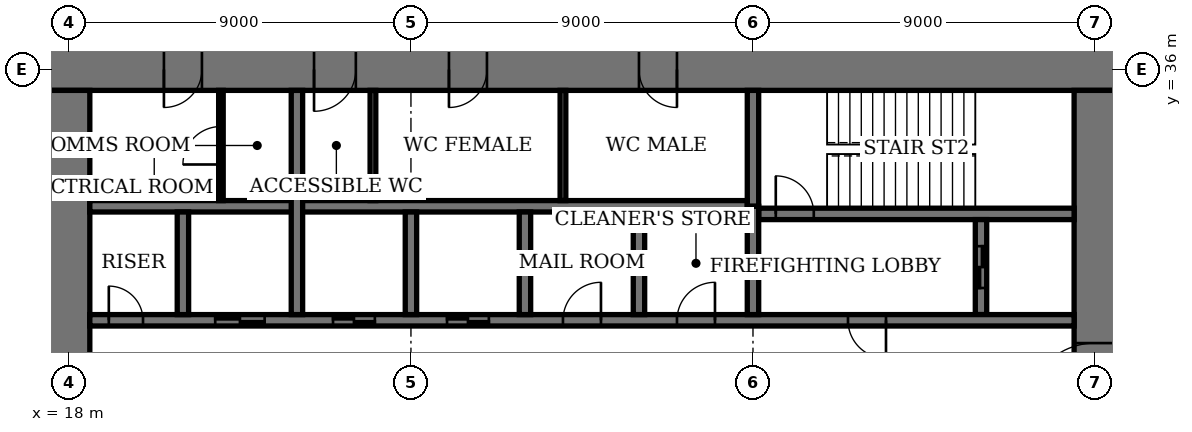
"""IFC4 building model, lengths in metres.
Left out: names, types, materials, properties, quantities, classifications, styles, units other than length and angle.
Written with IfcOpenShell. Run it as: python <this file> out.ifc"""

import sys

from ifc_helpers import new_model, si_unit, direction, frame, frame_2d, origin, place, context, subcontext, project, spatial, rectangle, extrude, element, fill, save


model = new_model("IFC4")
c1 = context("Model", 3, precision=1e-05, world=origin(), true_north=direction((0.0, 1.0)))
c2 = subcontext(c1, "Body", "Model", "MODEL_VIEW")
j1 = project(units=[si_unit("LENGTHUNIT", "METRE"), si_unit("PLANEANGLEUNIT", "RADIAN")], contexts=[c1])
p1 = place(None, origin())
s1 = spatial("IfcSite", under=j1, at=p1, CompositionType="ELEMENT")
p2 = place(p1, origin())
s2 = spatial("IfcBuilding", under=s1, at=p2, CompositionType="ELEMENT")
p3 = place(p2, frame((0.0, 0.0, 206.2)))
s3 = spatial("IfcBuildingStorey", under=s2, at=p3, CompositionType="ELEMENT", Elevation=206.2)
p4 = place(p3, frame((45.55, 36.0, 0.0), z_axis=(0.0, 0.0, 1.0), x_axis=(-1.0, 0.0, 0.0)))
e1 = element("IfcWall", 1, at=p4, inside=s3, PredefinedType="SHEAR", context=c2, shape_type="SweptSolid", body=[
    extrude(rectangle(XDim=28.1, YDim=1.1, at=frame_2d((14.05, 0.0))), origin(), (0.0, 0.0, 1.0), 4.0),
])
p5 = place(p4, frame((11.55, 0.0, 0.0)))
e2 = element("IfcOpeningElement", 2, at=p5, cuts=e1, PredefinedType="OPENING", context=c2, shape_type="SweptSolid", body=[
    extrude(rectangle(XDim=1.0, YDim=2.4, at=frame_2d((0.5, 1.2))), frame((0.0, 0.56, 0.0), z_axis=(0.0, -1.0, 0.0), x_axis=(1.0, 0.0, 0.0)), (0.0, 0.0, 1.0), 1.12),
])
p6 = place(p4, frame((16.55, 0.0, 0.0)))
e3 = element("IfcOpeningElement", 3, at=p6, cuts=e1, PredefinedType="OPENING", context=c2, shape_type="SweptSolid", body=[
    extrude(rectangle(XDim=1.0, YDim=2.4, at=frame_2d((0.5, 1.2))), frame((0.0, 0.56, 0.0), z_axis=(0.0, -1.0, 0.0), x_axis=(1.0, 0.0, 0.0)), (0.0, 0.0, 1.0), 1.12),
])
p7 = place(p4, frame((20.0, 0.0, 0.0)))
e4 = element("IfcOpeningElement", 4, at=p7, cuts=e1, PredefinedType="OPENING", context=c2, shape_type="SweptSolid", body=[
    extrude(rectangle(XDim=1.1, YDim=2.4, at=frame_2d((0.55, 1.2))), frame((0.0, 0.56, 0.0), z_axis=(0.0, -1.0, 0.0), x_axis=(1.0, 0.0, 0.0)), (0.0, 0.0, 1.0), 1.12),
])
p8 = place(p4, frame((24.05, 0.0, 0.0)))
e5 = element("IfcOpeningElement", 5, at=p8, cuts=e1, PredefinedType="OPENING", context=c2, shape_type="SweptSolid", body=[
    extrude(rectangle(XDim=1.0, YDim=2.4, at=frame_2d((0.5, 1.2))), frame((0.0, 0.56, 0.0), z_axis=(0.0, -1.0, 0.0), x_axis=(1.0, 0.0, 0.0)), (0.0, 0.0, 1.0), 1.12),
])
p9 = place(p3, frame((18.0, 35.45, 0.0), z_axis=(0.0, 0.0, 1.0), x_axis=(0.0, -1.0, 0.0)))
e6 = element("IfcWall", 6, at=p9, inside=s3, PredefinedType="SHEAR", context=c2, shape_type="SweptSolid", body=[
    extrude(rectangle(XDim=16.9, YDim=1.1, at=frame_2d((8.45, 0.0))), origin(), (0.0, 0.0, 1.0), 4.0),
])
p10 = place(p9, frame((8.45, 0.0, 0.0)))
e7 = element("IfcOpeningElement", 7, at=p10, cuts=e6, PredefinedType="OPENING", context=c2, shape_type="SweptSolid", body=[
    extrude(rectangle(XDim=1.8, YDim=2.4, at=frame_2d((0.9, 1.2))), frame((0.0, 0.56, 0.0), z_axis=(0.0, -1.0, 0.0), x_axis=(1.0, 0.0, 0.0)), (0.0, 0.0, 1.0), 1.12),
])
p11 = place(p3, frame((45.0, 18.55, 0.0), z_axis=(0.0, 0.0, 1.0), x_axis=(0.0, 1.0, 0.0)))
e8 = element("IfcWall", 8, at=p11, inside=s3, PredefinedType="SHEAR", context=c2, shape_type="SweptSolid", body=[
    extrude(rectangle(XDim=16.9, YDim=1.1, at=frame_2d((8.45, 0.0))), origin(), (0.0, 0.0, 1.0), 4.0),
])
p12 = place(p11, frame((8.45, 0.0, 0.0)))
e9 = element("IfcOpeningElement", 9, at=p12, cuts=e8, PredefinedType="OPENING", context=c2, shape_type="SweptSolid", body=[
    extrude(rectangle(XDim=1.8, YDim=2.4, at=frame_2d((0.9, 1.2))), frame((0.0, 0.56, 0.0), z_axis=(0.0, -1.0, 0.0), x_axis=(1.0, 0.0, 0.0)), (0.0, 0.0, 1.0), 1.12),
])
p13 = place(p3, frame((36.15, 32.2, 0.0), z_axis=(0.0, 0.0, 1.0), x_axis=(1.0, 0.0, 0.0)))
e10 = element("IfcWall", 10, at=p13, inside=s3, PredefinedType="SHEAR", context=c2, shape_type="SweptSolid", body=[
    extrude(rectangle(XDim=8.3, YDim=0.3, at=frame_2d((4.15, 0.0))), origin(), (0.0, 0.0, 1.0), 4.0),
])
p14 = place(p13, frame((0.45, 0.0, 0.0)))
e11 = element("IfcOpeningElement", 11, at=p14, cuts=e10, PredefinedType="OPENING", context=c2, shape_type="SweptSolid", body=[
    extrude(rectangle(XDim=1.0, YDim=2.4, at=frame_2d((0.5, 1.2))), frame((0.0, 0.16, 0.0), z_axis=(0.0, -1.0, 0.0), x_axis=(1.0, 0.0, 0.0)), (0.0, 0.0, 1.0), 0.32),
])
p15 = place(p3, frame((36.0, 32.4, 0.0), z_axis=(0.0, 0.0, 1.0), x_axis=(0.0, 1.0, 0.0)))
e12 = element("IfcWall", 12, at=p15, inside=s3, PredefinedType="SHEAR", context=c2, shape_type="SweptSolid", body=[
    extrude(rectangle(XDim=3.05, YDim=0.3, at=frame_2d((1.525, 0.0))), origin(), (0.0, 0.0, 1.0), 4.0),
])
p16 = place(p3, frame((42.0, 29.55, 0.0), z_axis=(0.0, 0.0, 1.0), x_axis=(0.0, 1.0, 0.0)))
e13 = element("IfcWall", 13, at=p16, inside=s3, PredefinedType="SHEAR", context=c2, shape_type="SweptSolid", body=[
    extrude(rectangle(XDim=2.5, YDim=0.3, at=frame_2d((1.25, 0.0))), origin(), (0.0, 0.0, 1.0), 4.0),
])
p17 = place(p16, frame((0.7, 0.0, 0.0)))
e14 = element("IfcOpeningElement", 14, at=p17, cuts=e13, PredefinedType="OPENING", context=c2, shape_type="SweptSolid", body=[
    extrude(rectangle(XDim=1.1, YDim=2.4, at=frame_2d((0.55, 1.2))), frame((0.0, 0.16, 0.0), z_axis=(0.0, -1.0, 0.0), x_axis=(1.0, 0.0, 0.0)), (0.0, 0.0, 1.0), 0.32),
])
p18 = place(p3, frame((18.55, 29.4, 0.0), z_axis=(0.0, 0.0, 1.0), x_axis=(1.0, 0.0, 0.0)))
e15 = element("IfcWall", 15, at=p18, inside=s3, PredefinedType="SHEAR", context=c2, shape_type="SweptSolid", body=[
    extrude(rectangle(XDim=25.9, YDim=0.3, at=frame_2d((12.95, 0.0))), origin(), (0.0, 0.0, 1.0), 4.0),
])
p19 = place(p18, frame((19.95, 0.0, 0.0)))
e16 = element("IfcOpeningElement", 16, at=p19, cuts=e15, PredefinedType="OPENING", context=c2, shape_type="SweptSolid", body=[
    extrude(rectangle(XDim=1.0, YDim=2.4, at=frame_2d((0.5, 1.2))), frame((0.0, 0.16, 0.0), z_axis=(0.0, -1.0, 0.0), x_axis=(1.0, 0.0, 0.0)), (0.0, 0.0, 1.0), 0.32),
])
p20 = place(p18, frame((0.5, 0.0, 0.0)))
e17 = element("IfcOpeningElement", 17, at=p20, cuts=e15, PredefinedType="OPENING", context=c2, shape_type="SweptSolid", body=[
    extrude(rectangle(XDim=0.9, YDim=2.1, at=frame_2d((0.45, 1.05))), frame((0.0, 0.16, 0.0), z_axis=(0.0, -1.0, 0.0), x_axis=(1.0, 0.0, 0.0)), (0.0, 0.0, 1.0), 0.32),
])
p21 = place(p18, frame((15.45, 0.0, 0.0)))
e18 = element("IfcOpeningElement", 18, at=p21, cuts=e15, PredefinedType="OPENING", context=c2, shape_type="SweptSolid", body=[
    extrude(rectangle(XDim=1.0, YDim=2.4, at=frame_2d((0.5, 1.2))), frame((0.0, 0.16, 0.0), z_axis=(0.0, -1.0, 0.0), x_axis=(1.0, 0.0, 0.0)), (0.0, 0.0, 1.0), 0.32),
])
p22 = place(p18, frame((12.45, 0.0, 0.0)))
e19 = element("IfcOpeningElement", 19, at=p22, cuts=e15, PredefinedType="OPENING", context=c2, shape_type="SweptSolid", body=[
    extrude(rectangle(XDim=1.0, YDim=2.4, at=frame_2d((0.5, 1.2))), frame((0.0, 0.16, 0.0), z_axis=(0.0, -1.0, 0.0), x_axis=(1.0, 0.0, 0.0)), (0.0, 0.0, 1.0), 0.32),
])
p23 = place(p18, frame((9.4, 0.0, 0.0)))
e20 = element("IfcOpeningElement", 20, at=p23, cuts=e15, PredefinedType="OPENING", context=c2, shape_type="SweptSolid", body=[
    extrude(rectangle(XDim=1.1, YDim=2.4, at=frame_2d((0.55, 1.2))), frame((0.0, 0.16, 0.0), z_axis=(0.0, -1.0, 0.0), x_axis=(1.0, 0.0, 0.0)), (0.0, 0.0, 1.0), 0.32),
])
p24 = place(p18, frame((6.4, 0.0, 0.0)))
e21 = element("IfcOpeningElement", 21, at=p24, cuts=e15, PredefinedType="OPENING", context=c2, shape_type="SweptSolid", body=[
    extrude(rectangle(XDim=1.1, YDim=2.4, at=frame_2d((0.55, 1.2))), frame((0.0, 0.16, 0.0), z_axis=(0.0, -1.0, 0.0), x_axis=(1.0, 0.0, 0.0)), (0.0, 0.0, 1.0), 0.32),
])
p25 = place(p18, frame((3.3, 0.0, 0.0)))
e22 = element("IfcOpeningElement", 22, at=p25, cuts=e15, PredefinedType="OPENING", context=c2, shape_type="SweptSolid", body=[
    extrude(rectangle(XDim=1.3, YDim=2.4, at=frame_2d((0.65, 1.2))), frame((0.0, 0.16, 0.0), z_axis=(0.0, -1.0, 0.0), x_axis=(1.0, 0.0, 0.0)), (0.0, 0.0, 1.0), 0.32),
])
p26 = place(p3, frame((18.55, 32.4, 0.0), z_axis=(0.0, 0.0, 1.0), x_axis=(1.0, 0.0, 0.0)))
e23 = element("IfcWall", 23, at=p26, inside=s3, PredefinedType="SHEAR", context=c2, shape_type="SweptSolid", body=[
    extrude(rectangle(XDim=17.3, YDim=0.3, at=frame_2d((8.65, 0.0))), origin(), (0.0, 0.0, 1.0), 4.0),
])
for number, where, z_axis, x_axis in (
    (24, (33.0, 29.55, 0.0), (0.0, 0.0, 1.0), (0.0, 1.0, 0.0)),
    (25, (30.0, 29.55, 0.0), (0.0, 0.0, 1.0), (0.0, 1.0, 0.0)),
    (26, (27.0, 29.55, 0.0), (0.0, 0.0, 1.0), (0.0, 1.0, 0.0)),
):
    element("IfcWall", number, at=place(p3, frame(where, z_axis=z_axis, x_axis=x_axis)), inside=s3, PredefinedType="SHEAR", context=c2, shape_type="SweptSolid", body=[
        extrude(rectangle(XDim=2.7, YDim=0.3, at=frame_2d((1.35, 0.0))), origin(), (0.0, 0.0, 1.0), 4.0),
    ])
p27 = place(p3, frame((24.0, 29.55, 0.0), z_axis=(0.0, 0.0, 1.0), x_axis=(0.0, 1.0, 0.0)))
e27 = element("IfcWall", 27, at=p27, inside=s3, PredefinedType="SHEAR", context=c2, shape_type="SweptSolid", body=[
    extrude(rectangle(XDim=5.9, YDim=0.3, at=frame_2d((2.95, 0.0))), origin(), (0.0, 0.0, 1.0), 4.0),
])
p28 = place(p3, frame((21.0, 29.55, 0.0), z_axis=(0.0, 0.0, 1.0), x_axis=(0.0, 1.0, 0.0)))
e28 = element("IfcWall", 28, at=p28, inside=s3, PredefinedType="SHEAR", context=c2, shape_type="SweptSolid", body=[
    extrude(rectangle(XDim=2.7, YDim=0.3, at=frame_2d((1.35, 0.0))), origin(), (0.0, 0.0, 1.0), 4.0),
])
p29 = place(p3, frame((36.0, 29.55, 0.0), z_axis=(0.0, 0.0, 1.0), x_axis=(0.0, 1.0, 0.0)))
e29 = element("IfcWall", 29, at=p29, inside=s3, PredefinedType="SHEAR", context=c2, shape_type="SweptSolid", body=[
    extrude(rectangle(XDim=2.85, YDim=0.3, at=frame_2d((1.425, 0.0))), origin(), (0.0, 0.0, 1.0), 4.0),
])
for number, where, z_axis, x_axis in (
    (30, (31.0, 32.55, 0.0), (0.0, 0.0, 1.0), (0.0, 1.0, 0.0)),
    (31, (26.0, 32.55, 0.0), (0.0, 0.0, 1.0), (0.0, 1.0, 0.0)),
):
    element("IfcWall", number, at=place(p3, frame(where, z_axis=z_axis, x_axis=x_axis)), inside=s3, PredefinedType="PARTITIONING", context=c2, shape_type="SweptSolid", body=[
        extrude(rectangle(XDim=2.9, YDim=0.15, at=frame_2d((1.45, 0.0))), origin(), (0.0, 0.0, 1.0), 3.75),
    ])
p30 = place(p3, frame((22.0, 32.55, 0.0), z_axis=(0.0, 0.0, 1.0), x_axis=(0.0, 1.0, 0.0)))
e32 = element("IfcWall", 32, at=p30, inside=s3, PredefinedType="PARTITIONING", context=c2, shape_type="SweptSolid", body=[
    extrude(rectangle(XDim=2.9, YDim=0.12, at=frame_2d((1.45, 0.0))), origin(), (0.0, 0.0, 1.0), 3.75),
])
p31 = place(p30, frame((0.95, 0.0, 0.0)))
e33 = element("IfcOpeningElement", 33, at=p31, cuts=e32, PredefinedType="OPENING", context=c2, shape_type="SweptSolid", body=[
    extrude(rectangle(XDim=1.0, YDim=2.4, at=frame_2d((0.5, 1.2))), frame((0.0, 0.07, 0.0), z_axis=(0.0, -1.0, 0.0), x_axis=(1.0, 0.0, 0.0)), (0.0, 0.0, 1.0), 0.14),
])
p32 = place(p12, origin())
e34 = element("IfcDoor", 34, at=p32, inside=s3, OperationType="DOUBLE_DOOR_DOUBLE_SWING", PredefinedType="DOOR", context=c2, shape_type="SweptSolid", body=[
    extrude(rectangle(XDim=1.8, YDim=2.4, at=frame_2d((0.9, 1.2))), frame((0.0, 0.03, 0.0), z_axis=(0.0, -1.0, 0.0), x_axis=(1.0, 0.0, 0.0)), (0.0, 0.0, 1.0), 0.06),
    extrude(rectangle(XDim=0.04, YDim=2.4, at=frame_2d((0.02, 1.2))), frame((0.0, 0.55, 0.0), z_axis=(0.0, -1.0, 0.0), x_axis=(1.0, 0.0, 0.0)), (0.0, 0.0, 1.0), 1.1),
    extrude(rectangle(XDim=0.04, YDim=2.4, at=frame_2d((1.78, 1.2))), frame((0.0, 0.55, 0.0), z_axis=(0.0, -1.0, 0.0), x_axis=(1.0, 0.0, 0.0)), (0.0, 0.0, 1.0), 1.1),
    extrude(rectangle(XDim=1.8, YDim=0.04, at=frame_2d((0.9, 2.38))), frame((0.0, 0.55, 0.0), z_axis=(0.0, -1.0, 0.0), x_axis=(1.0, 0.0, 0.0)), (0.0, 0.0, 1.0), 1.1),
])
fill(e9, e34)
p33 = place(p5, origin())
e35 = element("IfcDoor", 35, at=p33, inside=s3, OperationType="SINGLE_SWING_RIGHT", PredefinedType="DOOR", context=c2, shape_type="SweptSolid", body=[
    extrude(rectangle(XDim=1.0, YDim=2.4, at=frame_2d((0.5, 1.2))), frame((0.0, 0.025, 0.0), z_axis=(0.0, -1.0, 0.0), x_axis=(1.0, 0.0, 0.0)), (0.0, 0.0, 1.0), 0.05),
    extrude(rectangle(XDim=0.04, YDim=2.4, at=frame_2d((0.02, 1.2))), frame((0.0, 0.4, 0.0), z_axis=(0.0, -1.0, 0.0), x_axis=(1.0, 0.0, 0.0)), (0.0, 0.0, 1.0), 0.8),
    extrude(rectangle(XDim=0.04, YDim=2.4, at=frame_2d((0.98, 1.2))), frame((0.0, 0.4, 0.0), z_axis=(0.0, -1.0, 0.0), x_axis=(1.0, 0.0, 0.0)), (0.0, 0.0, 1.0), 0.8),
    extrude(rectangle(XDim=1.0, YDim=0.04, at=frame_2d((0.5, 2.38))), frame((0.0, 0.4, 0.0), z_axis=(0.0, -1.0, 0.0), x_axis=(1.0, 0.0, 0.0)), (0.0, 0.0, 1.0), 0.8),
])
fill(e2, e35)
p34 = place(p6, origin())
e36 = element("IfcDoor", 36, at=p34, inside=s3, OperationType="SINGLE_SWING_LEFT", PredefinedType="DOOR", context=c2, shape_type="SweptSolid", body=[
    extrude(rectangle(XDim=1.0, YDim=2.4, at=frame_2d((0.5, 1.2))), frame((0.0, 0.025, 0.0), z_axis=(0.0, -1.0, 0.0), x_axis=(1.0, 0.0, 0.0)), (0.0, 0.0, 1.0), 0.05),
    extrude(rectangle(XDim=0.04, YDim=2.4, at=frame_2d((0.02, 1.2))), frame((0.0, 0.4, 0.0), z_axis=(0.0, -1.0, 0.0), x_axis=(1.0, 0.0, 0.0)), (0.0, 0.0, 1.0), 0.8),
    extrude(rectangle(XDim=0.04, YDim=2.4, at=frame_2d((0.98, 1.2))), frame((0.0, 0.4, 0.0), z_axis=(0.0, -1.0, 0.0), x_axis=(1.0, 0.0, 0.0)), (0.0, 0.0, 1.0), 0.8),
    extrude(rectangle(XDim=1.0, YDim=0.04, at=frame_2d((0.5, 2.38))), frame((0.0, 0.4, 0.0), z_axis=(0.0, -1.0, 0.0), x_axis=(1.0, 0.0, 0.0)), (0.0, 0.0, 1.0), 0.8),
])
fill(e3, e36)
p35 = place(p7, origin())
e37 = element("IfcDoor", 37, at=p35, inside=s3, OperationType="SINGLE_SWING_LEFT", PredefinedType="DOOR", context=c2, shape_type="SweptSolid", body=[
    extrude(rectangle(XDim=1.1, YDim=2.4, at=frame_2d((0.55, 1.2))), frame((0.0, 0.025, 0.0), z_axis=(0.0, -1.0, 0.0), x_axis=(1.0, 0.0, 0.0)), (0.0, 0.0, 1.0), 0.05),
    extrude(rectangle(XDim=0.04, YDim=2.4, at=frame_2d((0.02, 1.2))), frame((0.0, 0.44, 0.0), z_axis=(0.0, -1.0, 0.0), x_axis=(1.0, 0.0, 0.0)), (0.0, 0.0, 1.0), 0.88),
    extrude(rectangle(XDim=0.04, YDim=2.4, at=frame_2d((1.08, 1.2))), frame((0.0, 0.44, 0.0), z_axis=(0.0, -1.0, 0.0), x_axis=(1.0, 0.0, 0.0)), (0.0, 0.0, 1.0), 0.88),
    extrude(rectangle(XDim=1.1, YDim=0.04, at=frame_2d((0.55, 2.38))), frame((0.0, 0.44, 0.0), z_axis=(0.0, -1.0, 0.0), x_axis=(1.0, 0.0, 0.0)), (0.0, 0.0, 1.0), 0.88),
])
fill(e4, e37)
p36 = place(p8, origin())
e38 = element("IfcDoor", 38, at=p36, inside=s3, OperationType="SINGLE_SWING_LEFT", PredefinedType="DOOR", context=c2, shape_type="SweptSolid", body=[
    extrude(rectangle(XDim=1.0, YDim=2.4, at=frame_2d((0.5, 1.2))), frame((0.0, 0.025, 0.0), z_axis=(0.0, -1.0, 0.0), x_axis=(1.0, 0.0, 0.0)), (0.0, 0.0, 1.0), 0.05),
    extrude(rectangle(XDim=0.04, YDim=2.4, at=frame_2d((0.02, 1.2))), frame((0.0, 0.4, 0.0), z_axis=(0.0, -1.0, 0.0), x_axis=(1.0, 0.0, 0.0)), (0.0, 0.0, 1.0), 0.8),
    extrude(rectangle(XDim=0.04, YDim=2.4, at=frame_2d((0.98, 1.2))), frame((0.0, 0.4, 0.0), z_axis=(0.0, -1.0, 0.0), x_axis=(1.0, 0.0, 0.0)), (0.0, 0.0, 1.0), 0.8),
    extrude(rectangle(XDim=1.0, YDim=0.04, at=frame_2d((0.5, 2.38))), frame((0.0, 0.4, 0.0), z_axis=(0.0, -1.0, 0.0), x_axis=(1.0, 0.0, 0.0)), (0.0, 0.0, 1.0), 0.8),
])
fill(e5, e38)
p37 = place(p14, origin())
e39 = element("IfcDoor", 39, at=p37, inside=s3, OperationType="SINGLE_SWING_RIGHT", PredefinedType="DOOR", context=c2, shape_type="SweptSolid", body=[
    extrude(rectangle(XDim=1.0, YDim=2.4, at=frame_2d((0.5, 1.2))), frame((0.0, 0.03, 0.0), z_axis=(0.0, -1.0, 0.0), x_axis=(1.0, 0.0, 0.0)), (0.0, 0.0, 1.0), 0.06),
])
fill(e11, e39)
p38 = place(p19, origin())
e40 = element("IfcDoor", 40, at=p38, inside=s3, OperationType="SINGLE_SWING_RIGHT", PredefinedType="DOOR", context=c2, shape_type="SweptSolid", body=[
    extrude(rectangle(XDim=1.0, YDim=2.4, at=frame_2d((0.5, 1.2))), frame((0.0, 0.03, 0.0), z_axis=(0.0, -1.0, 0.0), x_axis=(1.0, 0.0, 0.0)), (0.0, 0.0, 1.0), 0.06),
])
fill(e16, e40)
p39 = place(p20, origin())
e41 = element("IfcDoor", 41, at=p39, inside=s3, OperationType="SINGLE_SWING_RIGHT", PredefinedType="DOOR", context=c2, shape_type="SweptSolid", body=[
    extrude(rectangle(XDim=0.9, YDim=2.1, at=frame_2d((0.45, 1.05))), frame((0.0, 0.03, 0.0), z_axis=(0.0, -1.0, 0.0), x_axis=(1.0, 0.0, 0.0)), (0.0, 0.0, 1.0), 0.06),
])
fill(e17, e41)
p40 = place(p31, origin())
e42 = element("IfcDoor", 42, at=p40, inside=s3, OperationType="SINGLE_SWING_RIGHT", PredefinedType="DOOR", context=c2, shape_type="SweptSolid", body=[
    extrude(rectangle(XDim=1.0, YDim=2.4, at=frame_2d((0.5, 1.2))), frame((0.0, 0.03, 0.0), z_axis=(0.0, -1.0, 0.0), x_axis=(1.0, 0.0, 0.0)), (0.0, 0.0, 1.0), 0.06),
])
fill(e33, e42)
p41 = place(p21, origin())
e43 = element("IfcDoor", 43, at=p41, inside=s3, OperationType="SINGLE_SWING_LEFT", PredefinedType="DOOR", context=c2, shape_type="SweptSolid", body=[
    extrude(rectangle(XDim=1.0, YDim=2.4, at=frame_2d((0.5, 1.2))), frame((0.0, 0.03, 0.0), z_axis=(0.0, -1.0, 0.0), x_axis=(1.0, 0.0, 0.0)), (0.0, 0.0, 1.0), 0.06),
])
fill(e18, e43)
p42 = place(p22, origin())
e44 = element("IfcDoor", 44, at=p42, inside=s3, OperationType="SINGLE_SWING_LEFT", PredefinedType="DOOR", context=c2, shape_type="SweptSolid", body=[
    extrude(rectangle(XDim=1.0, YDim=2.4, at=frame_2d((0.5, 1.2))), frame((0.0, 0.03, 0.0), z_axis=(0.0, -1.0, 0.0), x_axis=(1.0, 0.0, 0.0)), (0.0, 0.0, 1.0), 0.06),
])
fill(e19, e44)
p43 = place(p23, origin())
e45 = element("IfcDoor", 45, at=p43, inside=s3, OperationType="DOUBLE_DOOR_SLIDING", PredefinedType="DOOR", context=c2, shape_type="SweptSolid", body=[
    extrude(rectangle(XDim=1.1, YDim=2.4, at=frame_2d((0.55, 1.2))), frame((0.0, 0.02, 0.0), z_axis=(0.0, -1.0, 0.0), x_axis=(1.0, 0.0, 0.0)), (0.0, 0.0, 1.0), 0.04),
])
fill(e20, e45)
p44 = place(p24, origin())
e46 = element("IfcDoor", 46, at=p44, inside=s3, OperationType="DOUBLE_DOOR_SLIDING", PredefinedType="DOOR", context=c2, shape_type="SweptSolid", body=[
    extrude(rectangle(XDim=1.1, YDim=2.4, at=frame_2d((0.55, 1.2))), frame((0.0, 0.02, 0.0), z_axis=(0.0, -1.0, 0.0), x_axis=(1.0, 0.0, 0.0)), (0.0, 0.0, 1.0), 0.04),
])
fill(e21, e46)
p45 = place(p25, origin())
e47 = element("IfcDoor", 47, at=p45, inside=s3, OperationType="DOUBLE_DOOR_SLIDING", PredefinedType="DOOR", context=c2, shape_type="SweptSolid", body=[
    extrude(rectangle(XDim=1.3, YDim=2.4, at=frame_2d((0.65, 1.2))), frame((0.0, 0.02, 0.0), z_axis=(0.0, -1.0, 0.0), x_axis=(1.0, 0.0, 0.0)), (0.0, 0.0, 1.0), 0.04),
])
fill(e22, e47)
p46 = place(p17, origin())
e48 = element("IfcDoor", 48, at=p46, inside=s3, OperationType="DOUBLE_DOOR_SLIDING", PredefinedType="DOOR", context=c2, shape_type="SweptSolid", body=[
    extrude(rectangle(XDim=1.1, YDim=2.4, at=frame_2d((0.55, 1.2))), frame((0.0, 0.03, 0.0), z_axis=(0.0, -1.0, 0.0), x_axis=(1.0, 0.0, 0.0)), (0.0, 0.0, 1.0), 0.06),
])
fill(e14, e48)
save(model, sys.argv[1])
